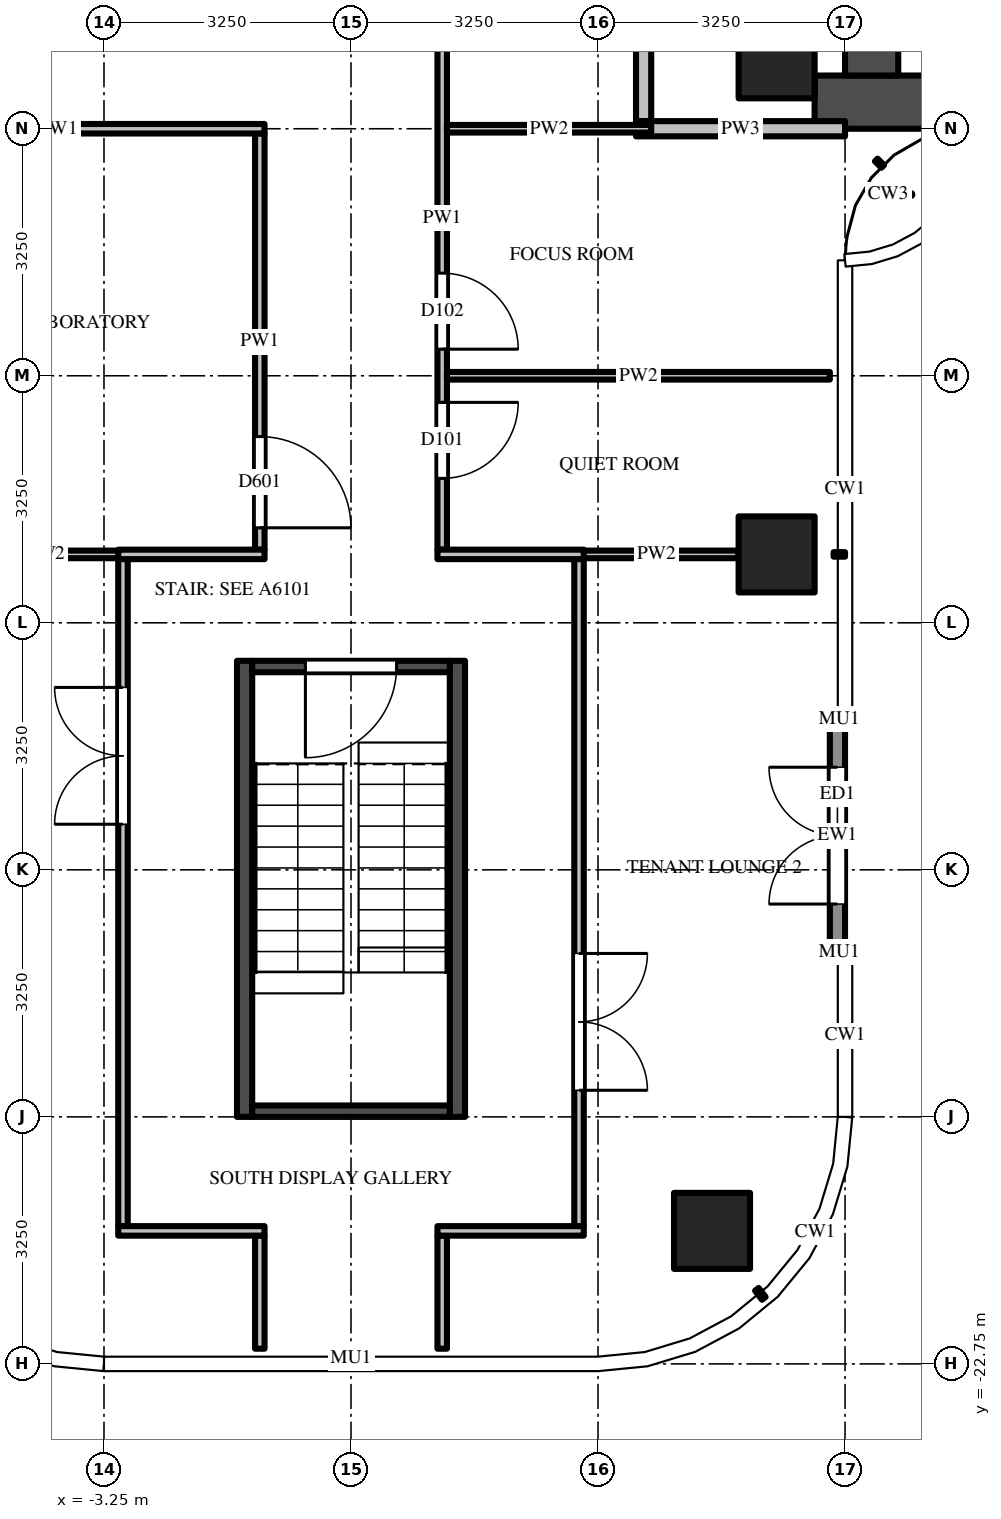
"""IFC4 building model, lengths in metres.
Left out: names, types, materials, properties, quantities, classifications, styles, units other than length and angle.
Written with IfcOpenShell. Run it as: python <this file> out.ifc"""

import sys

from ifc_helpers import new_model, si_unit, direction, frame, frame_2d, origin, origin_2d, place, context, subcontext, project, spatial, rectangle, extrude, source, transform, mapped, element, fill, save


model = new_model("IFC4")
c1 = context("Model", 3, precision=1e-05, world=origin(), true_north=direction((0.0, 1.0)))
c2 = subcontext(c1, "Body", "Model", "MODEL_VIEW")
j1 = project(units=[si_unit("LENGTHUNIT", "METRE"), si_unit("PLANEANGLEUNIT", "RADIAN")], contexts=[c1])
p1 = place(None, origin())
s1 = spatial("IfcSite", under=j1, at=p1, CompositionType="ELEMENT")
p2 = place(p1, origin())
s2 = spatial("IfcBuilding", under=s1, at=p2, CompositionType="ELEMENT")
p3 = place(p2, frame((0.0, 0.0, 291.1)))
s3 = spatial("IfcBuildingStorey", under=s2, at=p3, CompositionType="ELEMENT", Elevation=291.1)
m1 = source(origin(), c2, "Body", "SweptSolid", [
    extrude(rectangle(XDim=1.0, YDim=1.0, at=origin_2d()), origin(), (0.0, 0.0, 1.0), 3.9),
])
for number, where, z_axis, x_axis in (
    (1, (5.6, -5.6, 0.0), (0.0, 0.0, 1.0), (1.0, 0.0, 0.0)),
    (2, (5.6, -12.1, 0.0), (0.0, 0.0, 1.0), (1.0, 0.0, 0.0)),
    (3, (4.75, -21.0, 0.0), (0.0, 0.0, 1.0), (1.0, 0.0, 0.0)),
):
    element("IfcColumn", number, at=place(p3, frame(where, z_axis=z_axis, x_axis=x_axis)), inside=s3, PredefinedType="COLUMN", context=c2, shape_type="MappedRepresentation", body=[
        mapped(m1, transform((0.0, 0.0, 0.0))),
    ])
m2 = source(origin(), c2, "Body", "SweptSolid", [
    extrude(rectangle(XDim=16.65, YDim=0.7, at=frame_2d((8.325, 0.0))), origin(), (0.0, 0.0, 1.0), 3.7),
])
p4 = place(p3, frame((6.1, -6.15, 0.0), z_axis=(0.0, 0.0, 1.0), x_axis=(1.0, 0.0, 0.0)))
e4 = element("IfcWall", 4, at=p4, inside=s3, PredefinedType="SHEAR", context=c2, shape_type="MappedRepresentation", body=[
    mapped(m2, transform((0.0, 0.0, 0.0))),
])
m3 = source(origin(), c2, "Body", "SweptSolid", [
    extrude(rectangle(XDim=9.05, YDim=0.7, at=frame_2d((4.525, 0.0))), origin(), (0.0, 0.0, 1.0), 3.7),
])
p5 = place(p3, frame((6.85, -5.8, 0.0), z_axis=(0.0, 0.0, 1.0), x_axis=(0.0, 1.0, 0.0)))
e5 = element("IfcWall", 5, at=p5, inside=s3, PredefinedType="SHEAR", context=c2, shape_type="MappedRepresentation", body=[
    mapped(m3, transform((0.0, 0.0, 0.0))),
])
m4 = source(origin(), c2, "Body", "SweptSolid", [
    extrude(rectangle(XDim=1.8, YDim=2.1, at=frame_2d((0.9, 1.05))), frame((0.0, 0.36, 0.0), z_axis=(0.0, -1.0, 0.0), x_axis=(1.0, 0.0, 0.0)), (0.0, 0.0, 1.0), 0.72),
])
p6 = place(p5, frame((3.15, 0.0, 0.0)))
e6 = element("IfcOpeningElement", 6, at=p6, cuts=e5, PredefinedType="OPENING", context=c2, shape_type="MappedRepresentation", body=[
    mapped(m4, transform((0.0, 0.0, 0.0))),
])
m5 = source(origin(), c2, "Body", "SweptSolid", [
    extrude(rectangle(XDim=6.0, YDim=0.2, at=frame_2d((3.0, 0.0))), origin(), (0.0, 0.0, 1.0), 3.7),
])
for number, where, z_axis, x_axis in (
    (7, (1.4, -13.5, 0.0), (0.0, 0.0, 1.0), (0.0, -1.0, 0.0)),
    (8, (-1.4, -13.5, 0.0), (0.0, 0.0, 1.0), (0.0, -1.0, 0.0)),
):
    element("IfcWall", number, at=place(p3, frame(where, z_axis=z_axis, x_axis=x_axis)), inside=s3, PredefinedType="SHEAR", context=c2, shape_type="MappedRepresentation", body=[
        mapped(m5, transform((0.0, 0.0, 0.0))),
    ])
m6 = source(origin(), c2, "Body", "SweptSolid", [
    extrude(rectangle(XDim=2.6, YDim=0.15, at=frame_2d((1.3, 0.0))), origin(), (0.0, 0.0, 1.0), 3.7),
])
p7 = place(p3, frame((1.3, -13.575, 0.0), z_axis=(0.0, 0.0, 1.0), x_axis=(-1.0, 0.0, 0.0)))
e9 = element("IfcWall", 9, at=p7, inside=s3, PredefinedType="SHEAR", context=c2, shape_type="MappedRepresentation", body=[
    mapped(m6, transform((0.0, 0.0, 0.0))),
])
m7 = source(origin(), c2, "Body", "SweptSolid", [
    extrude(rectangle(XDim=1.2, YDim=2.1, at=frame_2d((0.6, 1.05))), frame((0.0, 0.085, 0.0), z_axis=(0.0, -1.0, 0.0), x_axis=(1.0, 0.0, 0.0)), (0.0, 0.0, 1.0), 0.17),
])
p8 = place(p7, frame((0.7, 0.0, 0.0)))
e10 = element("IfcOpeningElement", 10, at=p8, cuts=e9, PredefinedType="OPENING", context=c2, shape_type="MappedRepresentation", body=[
    mapped(m7, transform((0.0, 0.0, 0.0))),
])
p9 = place(p3, frame((1.3, -19.425, 0.0), z_axis=(0.0, 0.0, 1.0), x_axis=(-1.0, 0.0, 0.0)))
e11 = element("IfcWall", 11, at=p9, inside=s3, PredefinedType="SHEAR", context=c2, shape_type="MappedRepresentation", body=[
    mapped(m6, transform((0.0, 0.0, 0.0))),
])
m8 = source(origin(), c2, "Body", "SweptSolid", [
    extrude(rectangle(XDim=3.0, YDim=0.2, at=frame_2d((1.5, 0.0))), origin(), (0.0, 0.0, 1.0), 3.7),
])
p10 = place(p3, frame((6.4, -17.3, 0.0), z_axis=(0.0, 0.0, 1.0), x_axis=(0.0, 1.0, 0.0)))
e12 = element("IfcWall", 12, at=p10, inside=s3, PredefinedType="SOLIDWALL", context=c2, shape_type="MappedRepresentation", body=[
    mapped(m8, transform((0.0, 0.0, 0.0))),
])
m9 = source(origin(), c2, "Body", "SweptSolid", [
    extrude(rectangle(XDim=1.8, YDim=2.4, at=frame_2d((0.9, 1.2))), frame((0.0, 0.11, 0.0), z_axis=(0.0, -1.0, 0.0), x_axis=(1.0, 0.0, 0.0)), (0.0, 0.0, 1.0), 0.22),
])
p11 = place(p10, frame((0.6, 0.0, 0.0)))
e13 = element("IfcOpeningElement", 13, at=p11, cuts=e12, PredefinedType="OPENING", context=c2, shape_type="MappedRepresentation", body=[
    mapped(m9, transform((0.0, 0.0, 0.0))),
])
m10 = source(origin(), c2, "Body", "SweptSolid", [
    extrude(rectangle(XDim=8.788, YDim=0.125, at=frame_2d((4.394, 0.0))), origin(), (0.0, 0.0, 1.0), 2.78),
])
p12 = place(p3, frame((-3.0, -20.938, 0.0), z_axis=(0.0, 0.0, 1.0), x_axis=(0.0, 1.0, 0.0)))
e14 = element("IfcWall", 14, at=p12, inside=s3, PredefinedType="PARTITIONING", context=c2, shape_type="MappedRepresentation", body=[
    mapped(m10, transform((0.0, 0.0, 0.0))),
])
m11 = source(origin(), c2, "Body", "SweptSolid", [
    extrude(rectangle(XDim=1.8, YDim=2.1, at=frame_2d((0.9, 1.05))), frame((0.0, 0.073, 0.0), z_axis=(0.0, -1.0, 0.0), x_axis=(1.0, 0.0, 0.0)), (0.0, 0.0, 1.0), 0.145),
])
p13 = place(p12, frame((5.288, 0.0, 0.0)))
e15 = element("IfcOpeningElement", 15, at=p13, cuts=e14, PredefinedType="OPENING", context=c2, shape_type="MappedRepresentation", body=[
    mapped(m11, transform((0.0, 0.0, 0.0))),
])
m12 = source(origin(), c2, "Body", "SweptSolid", [
    extrude(rectangle(XDim=1.488, YDim=0.125, at=frame_2d((0.744, 0.0))), origin(), (0.0, 0.0, 1.0), 2.78),
])
p14 = place(p3, frame((-1.2, -21.062, 0.0), z_axis=(0.0, 0.0, 1.0), x_axis=(0.0, -1.0, 0.0)))
e16 = element("IfcWall", 16, at=p14, inside=s3, PredefinedType="PARTITIONING", context=c2, shape_type="MappedRepresentation", body=[
    mapped(m12, transform((0.0, 0.0, 0.0))),
])
m13 = source(origin(), c2, "Body", "SweptSolid", [
    extrude(rectangle(XDim=5.475, YDim=0.125, at=frame_2d((2.738, 0.0))), origin(), (0.0, 0.0, 1.0), 2.997),
])
p15 = place(p3, frame((-1.2, -6.562, 0.0), z_axis=(0.0, 0.0, 1.0), x_axis=(0.0, -1.0, 0.0)))
e17 = element("IfcWall", 17, at=p15, inside=s3, PredefinedType="PARTITIONING", context=c2, shape_type="MappedRepresentation", body=[
    mapped(m13, transform((0.0, 0.0, 0.0))),
])
m14 = source(origin(), c2, "Body", "SweptSolid", [
    extrude(rectangle(XDim=1.2, YDim=2.1, at=frame_2d((0.6, 1.05))), frame((0.0, 0.073, 0.0), z_axis=(0.0, -1.0, 0.0), x_axis=(1.0, 0.0, 0.0)), (0.0, 0.0, 1.0), 0.145),
])
p16 = place(p15, frame((3.988, 0.0, 0.0)))
e18 = element("IfcOpeningElement", 18, at=p16, cuts=e17, PredefinedType="OPENING", context=c2, shape_type="MappedRepresentation", body=[
    mapped(m14, transform((0.0, 0.0, 0.0))),
])
p17 = place(p3, frame((1.2, -21.062, 0.0), z_axis=(0.0, 0.0, 1.0), x_axis=(0.0, -1.0, 0.0)))
e19 = element("IfcWall", 19, at=p17, inside=s3, PredefinedType="PARTITIONING", context=c2, shape_type="MappedRepresentation", body=[
    mapped(m12, transform((0.0, 0.0, 0.0))),
])
m15 = source(origin(), c2, "Body", "SweptSolid", [
    extrude(rectangle(XDim=8.725, YDim=0.125, at=frame_2d((4.363, 0.0))), origin(), (0.0, 0.0, 1.0), 2.997),
])
p18 = place(p3, frame((1.2, -3.312, 0.0), z_axis=(0.0, 0.0, 1.0), x_axis=(0.0, -1.0, 0.0)))
e20 = element("IfcWall", 20, at=p18, inside=s3, PredefinedType="PARTITIONING", context=c2, shape_type="MappedRepresentation", body=[
    mapped(m15, transform((0.0, 0.0, 0.0))),
])
m16 = source(origin(), c2, "Body", "SweptSolid", [
    extrude(rectangle(XDim=1.0, YDim=2.1, at=frame_2d((0.5, 1.05))), frame((0.0, 0.073, 0.0), z_axis=(0.0, -1.0, 0.0), x_axis=(1.0, 0.0, 0.0)), (0.0, 0.0, 1.0), 0.145),
])
p19 = place(p18, frame((6.788, 0.0, 0.0)))
e21 = element("IfcOpeningElement", 21, at=p19, cuts=e20, PredefinedType="OPENING", context=c2, shape_type="MappedRepresentation", body=[
    mapped(m16, transform((0.0, 0.0, 0.0))),
])
p20 = place(p18, frame((5.087, 0.0, 0.0)))
e22 = element("IfcOpeningElement", 22, at=p20, cuts=e20, PredefinedType="OPENING", context=c2, shape_type="MappedRepresentation", body=[
    mapped(m16, transform((0.0, 0.0, 0.0))),
])
m17 = source(origin(), c2, "Body", "SweptSolid", [
    extrude(rectangle(XDim=1.1, YDim=2.1, at=frame_2d((0.55, 1.05))), frame((0.0, 0.073, 0.0), z_axis=(0.0, -1.0, 0.0), x_axis=(1.0, 0.0, 0.0)), (0.0, 0.0, 1.0), 0.145),
])
p21 = place(p18, frame((0.288, 0.0, 0.0)))
e23 = element("IfcOpeningElement", 23, at=p21, cuts=e20, PredefinedType="OPENING", context=c2, shape_type="MappedRepresentation", body=[
    mapped(m17, transform((0.0, 0.0, 0.0))),
])
p22 = place(p3, frame((3.0, -12.15, 0.0), z_axis=(0.0, 0.0, 1.0), x_axis=(0.0, -1.0, 0.0)))
e24 = element("IfcWall", 24, at=p22, inside=s3, PredefinedType="PARTITIONING", context=c2, shape_type="MappedRepresentation", body=[
    mapped(m10, transform((0.0, 0.0, 0.0))),
])
p23 = place(p22, frame((5.2, 0.0, 0.0)))
e25 = element("IfcOpeningElement", 25, at=p23, cuts=e24, PredefinedType="OPENING", context=c2, shape_type="MappedRepresentation", body=[
    mapped(m11, transform((0.0, 0.0, 0.0))),
])
m18 = source(origin(), c2, "Body", "SweptSolid", [
    extrude(rectangle(XDim=3.087, YDim=0.2, at=frame_2d((1.544, 0.0))), origin(), (0.0, 0.0, 1.0), 2.997),
])
p24 = place(p3, frame((3.85, -6.4, 0.0), z_axis=(0.0, 0.0, 1.0), x_axis=(0.0, 1.0, 0.0)))
e26 = element("IfcWall", 26, at=p24, inside=s3, PredefinedType="PARTITIONING", context=c2, shape_type="MappedRepresentation", body=[
    mapped(m18, transform((0.0, 0.0, 0.0))),
])
m19 = source(origin(), c2, "Body", "SweptSolid", [
    extrude(rectangle(XDim=1.925, YDim=0.125, at=frame_2d((0.962, 0.0))), origin(), (0.0, 0.0, 1.0), 2.78),
])
for number, where, z_axis, x_axis in (
    (27, (-1.137, -21.0, 0.0), (0.0, 0.0, 1.0), (-1.0, 0.0, 0.0)),
    (28, (3.062, -21.0, 0.0), (0.0, 0.0, 1.0), (-1.0, 0.0, 0.0)),
):
    element("IfcWall", number, at=place(p3, frame(where, z_axis=z_axis, x_axis=x_axis)), inside=s3, PredefinedType="PARTITIONING", context=c2, shape_type="MappedRepresentation", body=[
        mapped(m19, transform((0.0, 0.0, 0.0))),
    ])
m20 = source(origin(), c2, "Body", "SweptSolid", [
    extrude(rectangle(XDim=2.163, YDim=0.1, at=frame_2d((1.081, 0.0))), origin(), (0.0, 0.0, 1.0), 2.997),
])
for number, where, z_axis, x_axis in (
    (29, (-5.1, -12.1, 0.0), (0.0, 0.0, 1.0), (1.0, 0.0, 0.0)),
    (30, (2.938, -12.1, 0.0), (0.0, 0.0, 1.0), (1.0, 0.0, 0.0)),
):
    element("IfcWall", number, at=place(p3, frame(where, z_axis=z_axis, x_axis=x_axis)), inside=s3, PredefinedType="PARTITIONING", context=c2, shape_type="MappedRepresentation", body=[
        mapped(m20, transform((0.0, 0.0, 0.0))),
    ])
m21 = source(origin(), c2, "Body", "SweptSolid", [
    extrude(rectangle(XDim=1.925, YDim=0.125, at=frame_2d((0.962, 0.0))), origin(), (0.0, 0.0, 1.0), 2.997),
])
for number, where, z_axis, x_axis in (
    (31, (-3.062, -12.1, 0.0), (0.0, 0.0, 1.0), (1.0, 0.0, 0.0)),
    (32, (1.137, -12.1, 0.0), (0.0, 0.0, 1.0), (1.0, 0.0, 0.0)),
):
    element("IfcWall", number, at=place(p3, frame(where, z_axis=z_axis, x_axis=x_axis)), inside=s3, PredefinedType="PARTITIONING", context=c2, shape_type="MappedRepresentation", body=[
        mapped(m21, transform((0.0, 0.0, 0.0))),
    ])
m22 = source(origin(), c2, "Body", "SweptSolid", [
    extrude(rectangle(XDim=5.038, YDim=0.1, at=frame_2d((2.519, 0.0))), origin(), (0.0, 0.0, 1.0), 2.78),
])
p25 = place(p3, frame((1.262, -9.75, 0.0), z_axis=(0.0, 0.0, 1.0), x_axis=(1.0, 0.0, 0.0)))
e33 = element("IfcWall", 33, at=p25, inside=s3, PredefinedType="PARTITIONING", context=c2, shape_type="MappedRepresentation", body=[
    mapped(m22, transform((0.0, 0.0, 0.0))),
])
p26 = place(p3, frame((3.75, -6.5, 0.0), z_axis=(0.0, 0.0, 1.0), x_axis=(1.0, 0.0, 0.0)))
e34 = element("IfcWall", 34, at=p26, inside=s3, PredefinedType="PARTITIONING", context=c2, shape_type="SweptSolid", body=[
    extrude(rectangle(XDim=2.75, YDim=0.2, at=frame_2d((1.375, 0.0))), origin(), (0.0, 0.0, 1.0), 2.78),
])
m23 = source(origin(), c2, "Body", "SweptSolid", [
    extrude(rectangle(XDim=2.688, YDim=0.1, at=frame_2d((1.344, 0.0))), origin(), (0.0, 0.0, 1.0), 3.7),
])
p27 = place(p3, frame((1.262, -6.5, 0.0), z_axis=(0.0, 0.0, 1.0), x_axis=(1.0, 0.0, 0.0)))
e35 = element("IfcWall", 35, at=p27, inside=s3, PredefinedType="PARTITIONING", context=c2, shape_type="MappedRepresentation", body=[
    mapped(m23, transform((0.0, 0.0, 0.0))),
])
m24 = source(origin(), c2, "Body", "SweptSolid", [
    extrude(rectangle(XDim=5.425, YDim=0.125, at=frame_2d((2.712, 0.0))), origin(), (0.0, 0.0, 1.0), 2.78),
])
p28 = place(p3, frame((-1.137, -6.5, 0.0), z_axis=(0.0, 0.0, 1.0), x_axis=(-1.0, 0.0, 0.0)))
e36 = element("IfcWall", 36, at=p28, inside=s3, PredefinedType="PARTITIONING", context=c2, shape_type="MappedRepresentation", body=[
    mapped(m24, transform((0.0, 0.0, 0.0))),
])
m25 = source(origin(), c2, "Body", "SweptSolid", [
    extrude(rectangle(XDim=1.2, YDim=2.1, at=frame_2d((0.6, 1.05))), frame((0.0, 0.025, 0.0), z_axis=(0.0, -1.0, 0.0), x_axis=(1.0, 0.0, 0.0)), (0.0, 0.0, 1.0), 0.05),
])
p29 = place(p8, origin())
e37 = element("IfcDoor", 37, at=p29, inside=s3, OperationType="SINGLE_SWING_RIGHT", PredefinedType="DOOR", context=c2, shape_type="MappedRepresentation", body=[
    mapped(m25, transform((0.0, 0.0, 0.0))),
])
fill(e10, e37)
m26 = source(origin(), c2, "Body", "SweptSolid", [
    extrude(rectangle(XDim=1.8, YDim=2.4, at=frame_2d((0.9, 1.2))), frame((0.0, 0.025, 0.0), z_axis=(0.0, -1.0, 0.0), x_axis=(1.0, 0.0, 0.0)), (0.0, 0.0, 1.0), 0.05),
])
p30 = place(p11, origin())
e38 = element("IfcDoor", 38, at=p30, inside=s3, OperationType="DOUBLE_DOOR_SINGLE_SWING", PredefinedType="DOOR", context=c2, shape_type="MappedRepresentation", body=[
    mapped(m26, transform((0.0, 0.0, 0.0))),
])
fill(e13, e38)
m27 = source(origin(), c2, "Body", "SweptSolid", [
    extrude(rectangle(XDim=1.8, YDim=2.1, at=frame_2d((0.9, 1.05))), frame((0.0, 0.025, 0.0), z_axis=(0.0, -1.0, 0.0), x_axis=(1.0, 0.0, 0.0)), (0.0, 0.0, 1.0), 0.05),
])
p31 = place(p23, origin())
e39 = element("IfcDoor", 39, at=p31, inside=s3, OperationType="DOUBLE_DOOR_SINGLE_SWING", PredefinedType="DOOR", context=c2, shape_type="MappedRepresentation", body=[
    mapped(m27, transform((0.0, 0.0, 0.0))),
])
fill(e25, e39)
p32 = place(p13, origin())
e40 = element("IfcDoor", 40, at=p32, inside=s3, OperationType="DOUBLE_DOOR_SINGLE_SWING", PredefinedType="DOOR", context=c2, shape_type="MappedRepresentation", body=[
    mapped(m27, transform((0.0, 0.0, 0.0))),
])
fill(e15, e40)
p33 = place(p16, origin())
e41 = element("IfcDoor", 41, at=p33, inside=s3, OperationType="SINGLE_SWING_RIGHT", PredefinedType="DOOR", context=c2, shape_type="MappedRepresentation", body=[
    mapped(m25, transform((0.0, 0.0, 0.0))),
])
fill(e18, e41)
m28 = source(origin(), c2, "Body", "SweptSolid", [
    extrude(rectangle(XDim=1.0, YDim=2.1, at=frame_2d((0.5, 1.05))), frame((0.0, 0.025, 0.0), z_axis=(0.0, -1.0, 0.0), x_axis=(1.0, 0.0, 0.0)), (0.0, 0.0, 1.0), 0.05),
])
p34 = place(p19, origin())
e42 = element("IfcDoor", 42, at=p34, inside=s3, OperationType="SINGLE_SWING_LEFT", PredefinedType="DOOR", context=c2, shape_type="MappedRepresentation", body=[
    mapped(m28, transform((0.0, 0.0, 0.0))),
])
fill(e21, e42)
p35 = place(p20, origin())
e43 = element("IfcDoor", 43, at=p35, inside=s3, OperationType="SINGLE_SWING_RIGHT", PredefinedType="DOOR", context=c2, shape_type="MappedRepresentation", body=[
    mapped(m28, transform((0.0, 0.0, 0.0))),
])
fill(e22, e43)
save(model, sys.argv[1])
